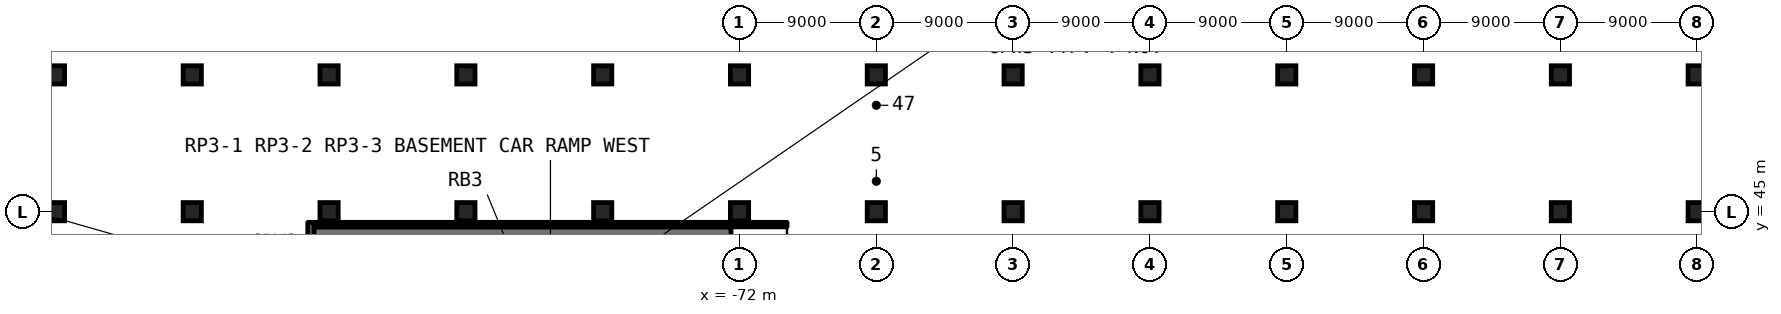
"""IFC4 building model, lengths in metres.
Left out: names, types, materials, properties, quantities, classifications, styles, units other than length and angle.
Written with IfcOpenShell. Run it as: python <this file> out.ifc"""

import sys

from ifc_helpers import new_model, si_unit, direction, frame, frame_2d, origin, origin_2d, place, context, subcontext, project, spatial, polyline, rectangle, outline, extrude, element, save


model = new_model("IFC4")
c1 = context("Model", 3, precision=1e-05, world=origin(), true_north=direction((0.0, 1.0)))
c2 = subcontext(c1, "Body", "Model", "MODEL_VIEW")
j1 = project(units=[si_unit("LENGTHUNIT", "METRE"), si_unit("PLANEANGLEUNIT", "RADIAN")], contexts=[c1])
p1 = place(None, origin())
s1 = spatial("IfcSite", under=j1, at=p1, CompositionType="ELEMENT")
p2 = place(p1, origin())
s2 = spatial("IfcBuilding", under=s1, at=p2, CompositionType="ELEMENT")
p3 = place(p2, frame((0.0, 0.0, -9.0)))
s3 = spatial("IfcBuildingStorey", under=s2, at=p3, CompositionType="ELEMENT", Elevation=-9.0)
for number, where, z_axis, x_axis in (
    (1, (-117.0, 45.0, 0.0), (0.0, 0.0, 1.0), (1.0, 0.0, 0.0)),
    (2, (-117.0, 54.0, 0.0), (0.0, 0.0, 1.0), (1.0, 0.0, 0.0)),
    (3, (-108.0, 45.0, 0.0), (0.0, 0.0, 1.0), (1.0, 0.0, 0.0)),
    (4, (-108.0, 54.0, 0.0), (0.0, 0.0, 1.0), (1.0, 0.0, 0.0)),
    (5, (-99.0, 45.0, 0.0), (0.0, 0.0, 1.0), (1.0, 0.0, 0.0)),
    (6, (-99.0, 54.0, 0.0), (0.0, 0.0, 1.0), (1.0, 0.0, 0.0)),
    (7, (-90.0, 45.0, 0.0), (0.0, 0.0, 1.0), (1.0, 0.0, 0.0)),
    (8, (-90.0, 54.0, 0.0), (0.0, 0.0, 1.0), (1.0, 0.0, 0.0)),
    (9, (-81.0, 45.0, 0.0), (0.0, 0.0, 1.0), (1.0, 0.0, 0.0)),
    (10, (-81.0, 54.0, 0.0), (0.0, 0.0, 1.0), (1.0, 0.0, 0.0)),
    (11, (-72.0, 45.0, 0.0), (0.0, 0.0, 1.0), (1.0, 0.0, 0.0)),
    (12, (-72.0, 54.0, 0.0), (0.0, 0.0, 1.0), (1.0, 0.0, 0.0)),
    (13, (-63.0, 45.0, 0.0), (0.0, 0.0, 1.0), (1.0, 0.0, 0.0)),
    (14, (-63.0, 54.0, 0.0), (0.0, 0.0, 1.0), (1.0, 0.0, 0.0)),
    (15, (-54.0, 45.0, 0.0), (0.0, 0.0, 1.0), (1.0, 0.0, 0.0)),
    (16, (-54.0, 54.0, 0.0), (0.0, 0.0, 1.0), (1.0, 0.0, 0.0)),
    (17, (-45.0, 45.0, 0.0), (0.0, 0.0, 1.0), (1.0, 0.0, 0.0)),
    (18, (-45.0, 54.0, 0.0), (0.0, 0.0, 1.0), (1.0, 0.0, 0.0)),
    (19, (-36.0, 45.0, 0.0), (0.0, 0.0, 1.0), (1.0, 0.0, 0.0)),
    (20, (-36.0, 54.0, 0.0), (0.0, 0.0, 1.0), (1.0, 0.0, 0.0)),
    (21, (-27.0, 45.0, 0.0), (0.0, 0.0, 1.0), (1.0, 0.0, 0.0)),
    (22, (-27.0, 54.0, 0.0), (0.0, 0.0, 1.0), (1.0, 0.0, 0.0)),
    (23, (-18.0, 45.0, 0.0), (0.0, 0.0, 1.0), (1.0, 0.0, 0.0)),
    (24, (-18.0, 54.0, 0.0), (0.0, 0.0, 1.0), (1.0, 0.0, 0.0)),
    (25, (-9.0, 45.0, 0.0), (0.0, 0.0, 1.0), (1.0, 0.0, 0.0)),
    (26, (-9.0, 54.0, 0.0), (0.0, 0.0, 1.0), (1.0, 0.0, 0.0)),
):
    element("IfcColumn", number, at=place(p3, frame(where, z_axis=z_axis, x_axis=x_axis)), inside=s3, PredefinedType="COLUMN", context=c2, shape_type="SweptSolid", body=[
        extrude(rectangle(XDim=1.2, YDim=1.2, at=origin_2d()), origin(), (0.0, 0.0, 1.0), 4.5),
    ])
p4 = place(p3, frame((-100.0, 40.5, 0.0), z_axis=(0.0, 0.0, 1.0), x_axis=(1.0, 0.0, 0.0)))
e27 = element("IfcWall", 27, at=p4, inside=s3, PredefinedType="SOLIDWALL", context=c2, shape_type="SweptSolid", body=[
    extrude(outline(polyline([(0.0, 0.0), (27.438, 0.0), (27.438, 0.05), (3.0, 3.96), (0.0, 4.2), (0.0, 0.0)])), frame((0.0, 3.5, 0.0), z_axis=(0.0, -1.0, 0.0), x_axis=(1.0, 0.0, 0.0)), (0.0, 0.0, 1.0), 7.0),
])
p5 = place(p3, frame((-100.0, 44.15, 0.0), z_axis=(0.0, 0.0, 1.0), x_axis=(1.0, 0.0, 0.0)))
e28 = element("IfcWall", 28, at=p5, inside=s3, PredefinedType="SOLIDWALL", context=c2, shape_type="SweptSolid", body=[
    extrude(rectangle(XDim=20.2, YDim=0.3, at=frame_2d((10.1, 0.0))), origin(), (0.0, 0.0, 1.0), 5.6),
])
p6 = place(p3, frame((-79.8, 44.15, 0.0), z_axis=(0.0, 0.0, 1.0), x_axis=(1.0, 0.0, 0.0)))
e29 = element("IfcWall", 29, at=p6, inside=s3, PredefinedType="SOLIDWALL", context=c2, shape_type="SweptSolid", body=[
    extrude(rectangle(XDim=10.925, YDim=0.3, at=frame_2d((5.462, 0.0))), origin(), (0.0, 0.0, 1.0), 4.1),
])
p7 = place(p3, frame((-100.2, 36.7, 0.0), z_axis=(0.0, 0.0, 1.0), x_axis=(0.0, 1.0, 0.0)))
e30 = element("IfcWall", 30, at=p7, inside=s3, PredefinedType="SOLIDWALL", context=c2, shape_type="SweptSolid", body=[
    extrude(rectangle(XDim=7.6, YDim=0.4, at=frame_2d((3.8, 0.0))), origin(), (0.0, 0.0, 1.0), 4.1),
])
save(model, sys.argv[1])
